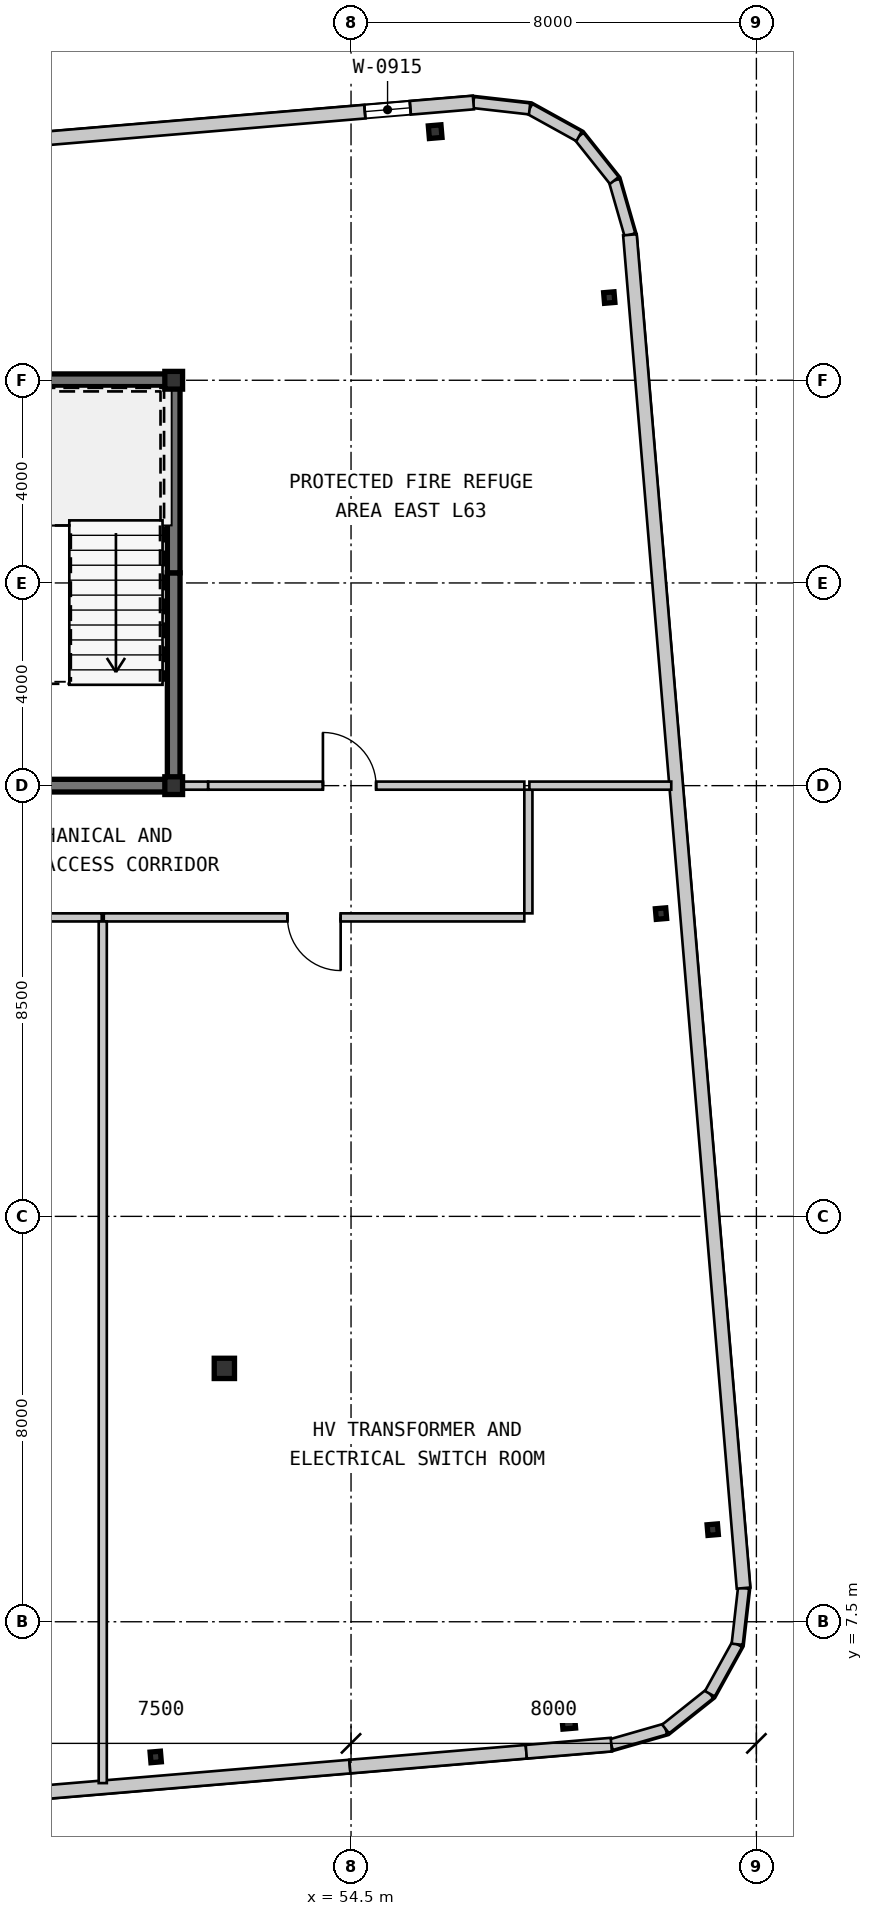
"""IFC4 building model, lengths in metres.
Left out: names, types, materials, properties, quantities, classifications, styles, units other than length and angle.
Written with IfcOpenShell. Run it as: python <this file> out.ifc"""

import sys

from ifc_helpers import new_model, si_unit, direction, frame, frame_2d, origin, origin_2d, place, context, subcontext, project, spatial, rectangle, hollow_rectangle, i_section, extrude, source, transform, mapped, element, fill, save


model = new_model("IFC4")
c1 = context("Model", 3, precision=1e-05, world=origin(), true_north=direction((0.0, 1.0)))
c2 = subcontext(c1, "Body", "Model", "MODEL_VIEW")
j1 = project(units=[si_unit("LENGTHUNIT", "METRE"), si_unit("PLANEANGLEUNIT", "RADIAN")], contexts=[c1])
p1 = place(None, origin())
s1 = spatial("IfcSite", under=j1, at=p1, CompositionType="ELEMENT")
p2 = place(p1, origin())
s2 = spatial("IfcBuilding", under=s1, at=p2, CompositionType="ELEMENT")
p3 = place(p2, frame((0.0, 0.0, 207.2)))
s3 = spatial("IfcBuildingStorey", under=s2, at=p3, CompositionType="ELEMENT", Elevation=207.2)
m1 = source(origin(), c2, "Body", "SweptSolid", [
    extrude(hollow_rectangle(XDim=0.35, YDim=0.35, WallThickness=0.016, at=origin_2d()), origin(), (0.0, 0.0, 1.0), 4.2),
])
for number, where, z_axis, x_axis in (
    (1, (51.0, 24.0, 0.0), (0.0, 0.0, 1.0), (1.0, 0.0, 0.0)),
    (2, (51.0, 32.0, 0.0), (0.0, 0.0, 1.0), (1.0, 0.0, 0.0)),
):
    element("IfcColumn", number, at=place(p3, frame(where, z_axis=z_axis, x_axis=x_axis)), inside=s3, PredefinedType="COLUMN", context=c2, shape_type="MappedRepresentation", body=[
        mapped(m1, transform((0.0, 0.0, 0.0), scale=1.0)),
    ])
m2 = source(origin(), c2, "Body", "SweptSolid", [
    extrude(hollow_rectangle(XDim=0.4, YDim=0.4, WallThickness=0.016, at=origin_2d()), origin(), (0.0, 0.0, 1.0), 4.2),
])
p4 = place(p3, frame((52.0, 12.5, 0.0), z_axis=(0.0, 0.0, 1.0), x_axis=(1.0, 0.0, 0.0)))
e3 = element("IfcColumn", 3, at=p4, inside=s3, PredefinedType="COLUMN", context=c2, shape_type="MappedRepresentation", body=[
    mapped(m2, transform((0.0, 0.0, 0.0), scale=1.0)),
])
m3 = source(origin(), c2, "Body", "SweptSolid", [
    extrude(i_section(OverallWidth=0.205, OverallDepth=0.21, WebThickness=0.009, FlangeThickness=0.014, at=origin_2d()), origin(), (0.0, 0.0, 1.0), 4.2),
])
p5 = place(p3, frame((50.645, 4.832, 0.0), z_axis=(0.0, 0.0, 1.0), x_axis=(0.99649285925, 0.083677843332, 0.0)))
e4 = element("IfcColumn", 4, at=p5, inside=s3, PredefinedType="COLUMN", context=c2, shape_type="MappedRepresentation", body=[
    mapped(m3, transform((0.0, 0.0, 0.0), scale=1.0)),
])
m4 = source(origin(), c2, "Body", "SweptSolid", [
    extrude(hollow_rectangle(XDim=0.25, YDim=0.25, WallThickness=0.01, at=origin_2d()), origin(), (0.0, 0.0, 1.0), 4.2),
])
for number, where, z_axis, x_axis in (
    (5, (58.796, 5.516, 0.0), (0.0, 0.0, 1.0), (0.996, 0.084, 0.0)),
    (6, (56.16, 36.906, 0.0), (0.0, 0.0, 1.0), (0.996, 0.084, 0.0)),
):
    element("IfcColumn", number, at=place(p3, frame(where, z_axis=z_axis, x_axis=x_axis)), inside=s3, PredefinedType="COLUMN", context=c2, shape_type="MappedRepresentation", body=[
        mapped(m4, transform((0.0, 0.0, 0.0), scale=1.0)),
    ])
for number, where, z_axis, x_axis in (
    (7, (61.638, 9.318, 0.0), (0.0, 0.0, 1.0), (0.996, 0.084, 0.0)),
    (8, (60.617, 21.475, 0.0), (0.0, 0.0, 1.0), (0.996, 0.084, 0.0)),
    (9, (59.596, 33.632, 0.0), (0.0, 0.0, 1.0), (0.996, 0.084, 0.0)),
):
    element("IfcColumn", number, at=place(p3, frame(where, z_axis=z_axis, x_axis=x_axis)), inside=s3, PredefinedType="COLUMN", context=c2, shape_type="MappedRepresentation", body=[
        mapped(m3, transform((0.0, 0.0, 0.0), scale=1.0)),
    ])
m5 = source(origin(), c2, "Body", "SweptSolid", [
    extrude(rectangle(XDim=1.116, YDim=0.22, at=frame_2d((0.558, 0.0))), origin(), (0.0, 0.0, 1.0), 3.78),
])
for number, where, z_axis, x_axis in (
    (10, (59.636, 5.075, 0.0), (0.0, 0.0, 1.0), (0.961, 0.277, 0.0)),
    (11, (60.708, 5.384, 0.0), (0.0, 0.0, 1.0), (0.782, 0.623, 0.0)),
    (12, (61.581, 6.079, 0.0), (0.0, 0.0, 1.0), (0.484, 0.875, 0.0)),
    (13, (62.121, 7.056, 0.0), (0.0, 0.0, 1.0), (0.112, 0.994, 0.0)),
    (14, (60.004, 34.87, 0.0), (0.0, 0.0, 1.0), (-0.277, 0.961, 0.0)),
    (15, (59.696, 35.943, 0.0), (0.0, 0.0, 1.0), (-0.623, 0.782, 0.0)),
    (16, (59.0, 36.816, 0.0), (0.0, 0.0, 1.0), (-0.875, 0.484, 0.0)),
    (17, (58.024, 37.356, 0.0), (0.0, 0.0, 1.0), (-0.994, 0.112, 0.0)),
):
    element("IfcWall", number, at=place(p3, frame(where, z_axis=z_axis, x_axis=x_axis)), inside=s3, PredefinedType="SOLIDWALL", context=c2, shape_type="MappedRepresentation", body=[
        mapped(m5, transform((0.0, 0.0, 0.0), scale=1.0)),
    ])
m6 = source(origin(), c2, "Body", "SweptSolid", [
    extrude(rectangle(XDim=37.323, YDim=0.27, at=frame_2d((18.661, 0.0))), origin(), (0.0, 0.0, 1.0), 3.78),
])
p6 = place(p3, frame((17.285, 1.519, 0.0), z_axis=(0.0, 0.0, 1.0), x_axis=(0.99649291123, 0.083677224315, 0.0)))
e18 = element("IfcWall", 18, at=p6, inside=s3, PredefinedType="SOLIDWALL", context=c2, shape_type="MappedRepresentation", body=[
    mapped(m6, transform((0.0, 0.0, 0.0), scale=1.0)),
])
m7 = source(origin(), c2, "Body", "SweptSolid", [
    extrude(rectangle(XDim=3.494, YDim=0.27, at=frame_2d((1.747, 0.0))), origin(), (0.0, 0.0, 1.0), 2.756),
])
p7 = place(p3, frame((54.477, 4.642, 0.0), z_axis=(0.0, 0.0, 1.0), x_axis=(0.996490607693, 0.083704652084, 0.0)))
e19 = element("IfcWall", 19, at=p7, inside=s3, PredefinedType="SOLIDWALL", context=c2, shape_type="MappedRepresentation", body=[
    mapped(m7, transform((0.0, 0.0, 0.0), scale=1.0)),
])
m8 = source(origin(), c2, "Body", "SweptSolid", [
    extrude(rectangle(XDim=1.683, YDim=0.27, at=frame_2d((0.842, 0.0))), origin(), (0.0, 0.0, 1.0), 3.78),
])
p8 = place(p3, frame((57.959, 4.934, 0.0), z_axis=(0.0, 0.0, 1.0), x_axis=(0.996491528907, 0.083693684451, 0.0)))
e20 = element("IfcWall", 20, at=p8, inside=s3, PredefinedType="SOLIDWALL", context=c2, shape_type="MappedRepresentation", body=[
    mapped(m8, transform((0.0, 0.0, 0.0), scale=1.0)),
])
m9 = source(origin(), c2, "Body", "SweptSolid", [
    extrude(rectangle(XDim=42.5, YDim=0.27, at=frame_2d((21.25, 0.0))), origin(), (0.0, 0.0, 1.0), 3.78),
])
p9 = place(p3, frame((56.915, 37.481, 0.0), z_axis=(0.0, 0.0, 1.0), x_axis=(-0.996492667128, -0.083680131217, 0.0)))
e21 = element("IfcWall", 21, at=p9, inside=s3, PredefinedType="SOLIDWALL", context=c2, shape_type="MappedRepresentation", body=[
    mapped(m9, transform((0.0, 0.0, 0.0), scale=1.0)),
])
m10 = source(origin(), c2, "Body", "SweptSolid", [
    extrude(rectangle(XDim=0.9, YDim=1.5, at=frame_2d((0.45, 0.75))), frame((0.0, 0.145, 0.0), z_axis=(0.0, -1.0, 0.0), x_axis=(1.0, 0.0, 0.0)), (0.0, 0.0, 1.0), 0.29),
])
p10 = place(p9, frame((1.25, 0.0, 1.1)))
e22 = element("IfcOpeningElement", 22, at=p10, cuts=e21, PredefinedType="OPENING", context=c2, shape_type="MappedRepresentation", body=[
    mapped(m10, transform((0.0, 0.0, 0.0), scale=1.0)),
])
m11 = source(origin(), c2, "Body", "SweptSolid", [
    extrude(rectangle(XDim=26.8, YDim=0.27, at=frame_2d((13.4, 0.0))), origin(), (0.0, 0.0, 1.0), 3.78),
])
p11 = place(p3, frame((62.247, 8.165, 0.0), z_axis=(0.0, 0.0, 1.0), x_axis=(-0.083682519839, 0.996492466541, 0.0)))
e23 = element("IfcWall", 23, at=p11, inside=s3, PredefinedType="SOLIDWALL", context=c2, shape_type="MappedRepresentation", body=[
    mapped(m11, transform((0.0, 0.0, 0.0), scale=1.0)),
])
m12 = source(origin(), c2, "Body", "SweptSolid", [
    extrude(rectangle(XDim=11.925, YDim=0.25, at=frame_2d((5.962, 0.0))), origin(), (0.0, 0.0, 1.0), 3.78),
])
p12 = place(p3, frame((39.2, 32.0, 0.0), z_axis=(0.0, 0.0, 1.0), x_axis=(1.0, 0.0, 0.0)))
e24 = element("IfcWall", 24, at=p12, inside=s3, PredefinedType="SHEAR", context=c2, shape_type="MappedRepresentation", body=[
    mapped(m12, transform((0.0, 0.0, 0.0), scale=1.0)),
])
m13 = source(origin(), c2, "Body", "SweptSolid", [
    extrude(rectangle(XDim=4.075, YDim=0.25, at=frame_2d((2.038, 0.0))), origin(), (0.0, 0.0, 1.0), 3.78),
])
p13 = place(p3, frame((51.0, 24.125, 0.0), z_axis=(0.0, 0.0, 1.0), x_axis=(0.0, 1.0, 0.0)))
e25 = element("IfcWall", 25, at=p13, inside=s3, PredefinedType="SHEAR", context=c2, shape_type="MappedRepresentation", body=[
    mapped(m13, transform((0.0, 0.0, 0.0), scale=1.0)),
])
m14 = source(origin(), c2, "Body", "SweptSolid", [
    extrude(rectangle(XDim=3.675, YDim=0.25, at=frame_2d((1.837, 0.0))), origin(), (0.0, 0.0, 1.0), 3.78),
])
p14 = place(p3, frame((51.0, 28.2, 0.0), z_axis=(0.0, 0.0, 1.0), x_axis=(0.0, 1.0, 0.0)))
e26 = element("IfcWall", 26, at=p14, inside=s3, PredefinedType="SHEAR", context=c2, shape_type="MappedRepresentation", body=[
    mapped(m14, transform((0.0, 0.0, 0.0), scale=1.0)),
])
m15 = source(origin(), c2, "Body", "SweptSolid", [
    extrude(rectangle(XDim=4.85, YDim=0.25, at=frame_2d((2.425, 0.0))), origin(), (0.0, 0.0, 1.0), 3.78),
])
p15 = place(p3, frame((46.275, 24.0, 0.0), z_axis=(0.0, 0.0, 1.0), x_axis=(1.0, 0.0, 0.0)))
e27 = element("IfcWall", 27, at=p15, inside=s3, PredefinedType="SHEAR", context=c2, shape_type="MappedRepresentation", body=[
    mapped(m15, transform((0.0, 0.0, 0.0), scale=1.0)),
])
m16 = source(origin(), c2, "Body", "SweptSolid", [
    extrude(rectangle(XDim=0.556, YDim=0.16, at=frame_2d((0.278, 0.0))), origin(), (0.0, 0.0, 1.0), 3.32),
])
p16 = place(p3, frame((51.125, 24.0, 0.0), z_axis=(0.0, 0.0, 1.0), x_axis=(1.0, 0.0, 0.0)))
e28 = element("IfcWall", 28, at=p16, inside=s3, PredefinedType="PARTITIONING", context=c2, shape_type="MappedRepresentation", body=[
    mapped(m16, transform((0.0, 0.0, 0.0), scale=1.0)),
])
m17 = source(origin(), c2, "Body", "SweptSolid", [
    extrude(rectangle(XDim=6.239, YDim=0.16, at=frame_2d((3.12, 0.0))), origin(), (0.0, 0.0, 1.0), 3.78),
])
p17 = place(p3, frame((51.681, 24.0, 0.0), z_axis=(0.0, 0.0, 1.0), x_axis=(1.0, 0.0, 0.0)))
e29 = element("IfcWall", 29, at=p17, inside=s3, PredefinedType="PARTITIONING", context=c2, shape_type="MappedRepresentation", body=[
    mapped(m17, transform((0.0, 0.0, 0.0), scale=1.0)),
])
m18 = source(origin(), c2, "Body", "SweptSolid", [
    extrude(rectangle(XDim=1.05, YDim=2.1, at=frame_2d((0.525, 1.05))), frame((0.0, 0.09, 0.0), z_axis=(0.0, -1.0, 0.0), x_axis=(1.0, 0.0, 0.0)), (0.0, 0.0, 1.0), 0.18),
])
p18 = place(p17, frame((2.264, 0.0, 0.0)))
e30 = element("IfcOpeningElement", 30, at=p18, cuts=e29, PredefinedType="OPENING", context=c2, shape_type="MappedRepresentation", body=[
    mapped(m18, transform((0.0, 0.0, 0.0), scale=1.0)),
])
m19 = source(origin(), c2, "Body", "SweptSolid", [
    extrude(rectangle(XDim=11.96, YDim=0.16, at=frame_2d((5.98, 0.0))), origin(), (0.0, 0.0, 1.0), 3.78),
])
p19 = place(p3, frame((49.58, 21.4, 0.0), z_axis=(0.0, 0.0, 1.0), x_axis=(-1.0, 0.0, 0.0)))
e31 = element("IfcWall", 31, at=p19, inside=s3, PredefinedType="PARTITIONING", context=c2, shape_type="MappedRepresentation", body=[
    mapped(m19, transform((0.0, 0.0, 0.0), scale=1.0)),
])
p20 = place(p19, frame((5.455, 0.0, 0.0)))
e32 = element("IfcOpeningElement", 32, at=p20, cuts=e31, PredefinedType="OPENING", context=c2, shape_type="MappedRepresentation", body=[
    mapped(m18, transform((0.0, 0.0, 0.0), scale=1.0)),
])
m20 = source(origin(), c2, "Body", "SweptSolid", [
    extrude(rectangle(XDim=8.3, YDim=0.16, at=frame_2d((4.15, 0.0))), origin(), (0.0, 0.0, 1.0), 3.78),
])
p21 = place(p3, frame((57.92, 21.4, 0.0), z_axis=(0.0, 0.0, 1.0), x_axis=(-1.0, 0.0, 0.0)))
e33 = element("IfcWall", 33, at=p21, inside=s3, PredefinedType="PARTITIONING", context=c2, shape_type="MappedRepresentation", body=[
    mapped(m20, transform((0.0, 0.0, 0.0), scale=1.0)),
])
p22 = place(p21, frame((3.625, 0.0, 0.0)))
e34 = element("IfcOpeningElement", 34, at=p22, cuts=e33, PredefinedType="OPENING", context=c2, shape_type="MappedRepresentation", body=[
    mapped(m18, transform((0.0, 0.0, 0.0), scale=1.0)),
])
m21 = source(origin(), c2, "Body", "SweptSolid", [
    extrude(rectangle(XDim=2.44, YDim=0.16, at=frame_2d((1.22, 0.0))), origin(), (0.0, 0.0, 1.0), 3.78),
])
p23 = place(p3, frame((58.0, 23.92, 0.0), z_axis=(0.0, 0.0, 1.0), x_axis=(0.0, -1.0, 0.0)))
e35 = element("IfcWall", 35, at=p23, inside=s3, PredefinedType="PARTITIONING", context=c2, shape_type="MappedRepresentation", body=[
    mapped(m21, transform((0.0, 0.0, 0.0), scale=1.0)),
])
m22 = source(origin(), c2, "Body", "SweptSolid", [
    extrude(rectangle(XDim=2.8, YDim=0.16, at=frame_2d((1.4, 0.0))), origin(), (0.0, 0.0, 1.0), 3.78),
])
p24 = place(p3, frame((60.82, 24.0, 0.0), z_axis=(0.0, 0.0, 1.0), x_axis=(-1.0, 0.0, 0.0)))
e36 = element("IfcWall", 36, at=p24, inside=s3, PredefinedType="PARTITIONING", context=c2, shape_type="MappedRepresentation", body=[
    mapped(m22, transform((0.0, 0.0, 0.0), scale=1.0)),
])
m23 = source(origin(), c2, "Body", "SweptSolid", [
    extrude(rectangle(XDim=17.004, YDim=0.16, at=frame_2d((8.502, 0.0))), origin(), (0.0, 0.0, 1.0), 3.78),
])
p25 = place(p3, frame((49.6, 21.32, 0.0), z_axis=(0.0, 0.0, 1.0), x_axis=(0.0, -1.0, 0.0)))
e37 = element("IfcWall", 37, at=p25, inside=s3, PredefinedType="PARTITIONING", context=c2, shape_type="MappedRepresentation", body=[
    mapped(m23, transform((0.0, 0.0, 0.0), scale=1.0)),
])
m24 = source(origin(), c2, "Body", "SweptSolid", [
    extrude(rectangle(XDim=0.9, YDim=1.5, at=frame_2d((0.45, 0.75))), frame((0.0, 0.03, 0.0), z_axis=(0.0, -1.0, 0.0), x_axis=(1.0, 0.0, 0.0)), (0.0, 0.0, 1.0), 0.06),
])
p26 = place(p10, origin())
e38 = element("IfcWindow", 38, at=p26, inside=s3, PartitioningType="SINGLE_PANEL", PredefinedType="WINDOW", context=c2, shape_type="MappedRepresentation", body=[
    mapped(m24, transform((0.0, 0.0, 0.0), scale=1.0)),
])
fill(e22, e38)
m25 = source(origin(), c2, "Body", "SweptSolid", [
    extrude(rectangle(XDim=1.05, YDim=2.1, at=frame_2d((0.525, 1.05))), frame((0.0, 0.025, 0.0), z_axis=(0.0, -1.0, 0.0), x_axis=(1.0, 0.0, 0.0)), (0.0, 0.0, 1.0), 0.05),
])
p27 = place(p18, origin())
e39 = element("IfcDoor", 39, at=p27, inside=s3, OperationType="SINGLE_SWING_LEFT", PredefinedType="DOOR", context=c2, shape_type="MappedRepresentation", body=[
    mapped(m25, transform((0.0, 0.0, 0.0), scale=1.0)),
])
fill(e30, e39)
p28 = place(p22, origin())
e40 = element("IfcDoor", 40, at=p28, inside=s3, OperationType="SINGLE_SWING_LEFT", PredefinedType="DOOR", context=c2, shape_type="MappedRepresentation", body=[
    mapped(m25, transform((0.0, 0.0, 0.0), scale=1.0)),
])
fill(e34, e40)
save(model, sys.argv[1])
